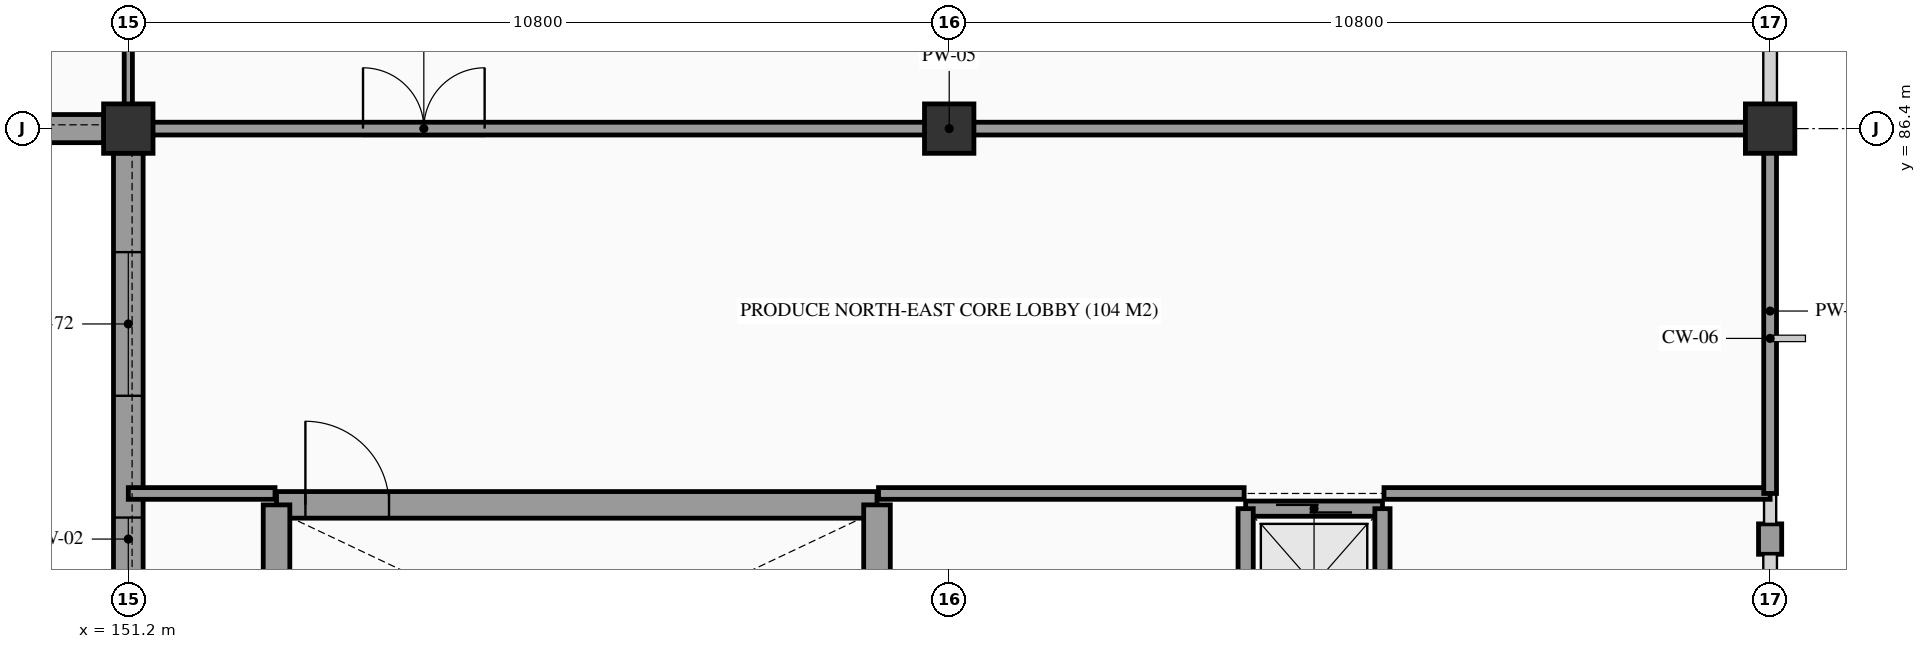
"""IFC4 building model, lengths in metres.
Left out: names, types, materials, properties, quantities, classifications, styles, units other than length and angle.
Written with IfcOpenShell. Run it as: python <this file> out.ifc"""

import sys

from ifc_helpers import new_model, si_unit, direction, frame, frame_2d, origin, origin_2d, place, context, subcontext, project, spatial, rectangle, extrude, element, fill, save


model = new_model("IFC4")
c1 = context("Model", 3, precision=1e-05, world=origin(), true_north=direction((0.0, 1.0)))
c2 = subcontext(c1, "Body", "Model", "MODEL_VIEW")
j1 = project(units=[si_unit("LENGTHUNIT", "METRE"), si_unit("PLANEANGLEUNIT", "RADIAN")], contexts=[c1])
p1 = place(None, origin())
s1 = spatial("IfcSite", under=j1, at=p1, CompositionType="ELEMENT")
p2 = place(p1, origin())
s2 = spatial("IfcBuilding", under=s1, at=p2, CompositionType="ELEMENT")
p3 = place(p2, frame((0.0, 0.0, 5.4)))
s3 = spatial("IfcBuildingStorey", under=s2, at=p3, CompositionType="ELEMENT", Elevation=5.4)
for number, where, z_axis, x_axis in (
    (1, (151.2, 86.4, 0.0), (0.0, 0.0, 1.0), (1.0, 0.0, 0.0)),
    (2, (162.0, 86.4, 0.0), (0.0, 0.0, 1.0), (1.0, 0.0, 0.0)),
    (3, (172.8, 86.4, 0.0), (0.0, 0.0, 1.0), (1.0, 0.0, 0.0)),
):
    element("IfcColumn", number, at=place(p3, frame(where, z_axis=z_axis, x_axis=x_axis)), inside=s3, PredefinedType="COLUMN", context=c2, shape_type="SweptSolid", body=[
        extrude(rectangle(XDim=0.65, YDim=0.65, at=origin_2d()), origin(), (0.0, 0.0, 1.0), 4.68),
    ])
p4 = place(p3, frame((140.72, 86.4, 0.0), z_axis=(0.0, 0.0, 1.0), x_axis=(1.0, 0.0, 0.0)))
e4 = element("IfcWall", 4, at=p4, inside=s3, PredefinedType="STANDARD", context=c2, shape_type="SweptSolid", body=[
    extrude(rectangle(XDim=10.16, YDim=0.37, at=frame_2d((5.08, 0.0))), origin(), (0.0, 0.0, 1.0), 3.53),
])
p5 = place(p4, frame((1.105, 0.0, 0.95)))
e5 = element("IfcOpeningElement", 5, at=p5, cuts=e4, PredefinedType="OPENING", context=c2, shape_type="SweptSolid", body=[
    extrude(rectangle(XDim=1.89, YDim=1.95, at=frame_2d((0.945, 0.975))), frame((0.0, 0.195, 0.0), z_axis=(0.0, -1.0, 0.0), x_axis=(1.0, 0.0, 0.0)), (0.0, 0.0, 1.0), 0.39),
])
p6 = place(p4, frame((4.455, 0.0, 0.95)))
e6 = element("IfcOpeningElement", 6, at=p6, cuts=e4, PredefinedType="OPENING", context=c2, shape_type="SweptSolid", body=[
    extrude(rectangle(XDim=1.05, YDim=2.1, at=frame_2d((0.525, 1.05))), frame((0.0, 0.195, 0.0), z_axis=(0.0, -1.0, 0.0), x_axis=(1.0, 0.0, 0.0)), (0.0, 0.0, 1.0), 0.39),
])
p7 = place(p4, frame((7.325, 0.0, 0.95)))
e7 = element("IfcOpeningElement", 7, at=p7, cuts=e4, PredefinedType="OPENING", context=c2, shape_type="SweptSolid", body=[
    extrude(rectangle(XDim=1.17, YDim=2.1, at=frame_2d((0.585, 1.05))), frame((0.0, 0.195, 0.0), z_axis=(0.0, -1.0, 0.0), x_axis=(1.0, 0.0, 0.0)), (0.0, 0.0, 1.0), 0.39),
])
p8 = place(p3, frame((151.2, 75.92, 0.0), z_axis=(0.0, 0.0, 1.0), x_axis=(0.0, 1.0, 0.0)))
e8 = element("IfcWall", 8, at=p8, inside=s3, PredefinedType="STANDARD", context=c2, shape_type="SweptSolid", body=[
    extrude(rectangle(XDim=10.16, YDim=0.39, at=frame_2d((5.08, 0.0))), origin(), (0.0, 0.0, 1.0), 3.53),
])
p9 = place(p8, frame((1.225, 0.0, 0.95)))
e9 = element("IfcOpeningElement", 9, at=p9, cuts=e8, PredefinedType="OPENING", context=c2, shape_type="SweptSolid", body=[
    extrude(rectangle(XDim=1.65, YDim=2.1, at=frame_2d((0.825, 1.05))), frame((0.0, 0.205, 0.0), z_axis=(0.0, -1.0, 0.0), x_axis=(1.0, 0.0, 0.0)), (0.0, 0.0, 1.0), 0.41),
])
p10 = place(p8, frame((3.593, 0.0, 0.95)))
e10 = element("IfcOpeningElement", 10, at=p10, cuts=e8, PredefinedType="OPENING", context=c2, shape_type="SweptSolid", body=[
    extrude(rectangle(XDim=1.77, YDim=2.1, at=frame_2d((0.885, 1.05))), frame((0.0, 0.205, 0.0), z_axis=(0.0, -1.0, 0.0), x_axis=(1.0, 0.0, 0.0)), (0.0, 0.0, 1.0), 0.41),
])
p11 = place(p8, frame((6.965, 0.0, 0.95)))
e11 = element("IfcOpeningElement", 11, at=p11, cuts=e8, PredefinedType="OPENING", context=c2, shape_type="SweptSolid", body=[
    extrude(rectangle(XDim=1.89, YDim=2.1, at=frame_2d((0.945, 1.05))), frame((0.0, 0.205, 0.0), z_axis=(0.0, -1.0, 0.0), x_axis=(1.0, 0.0, 0.0)), (0.0, 0.0, 1.0), 0.41),
])
p12 = place(p3, frame((172.8, 80.8, 0.0), z_axis=(0.0, 0.0, 1.0), x_axis=(0.0, 1.0, 0.0)))
e12 = element("IfcWall", 12, at=p12, inside=s3, PredefinedType="STANDARD", context=c2, shape_type="SweptSolid", body=[
    extrude(rectangle(XDim=0.4, YDim=0.305, at=frame_2d((0.2, 0.0))), origin(), (0.0, 0.0, 1.0), 2.38),
])
p13 = place(p3, frame((153.15, 81.45, 0.0), z_axis=(0.0, 0.0, 1.0), x_axis=(1.0, 0.0, 0.0)))
e13 = element("IfcWall", 13, at=p13, inside=s3, PredefinedType="SHEAR", context=c2, shape_type="SweptSolid", body=[
    extrude(rectangle(XDim=7.9, YDim=0.35, at=frame_2d((3.95, 0.0))), origin(), (0.0, 0.0, 1.0), 4.68),
])
p14 = place(p13, frame((0.38, 0.0, 0.0)))
e14 = element("IfcOpeningElement", 14, at=p14, cuts=e13, PredefinedType="OPENING", context=c2, shape_type="SweptSolid", body=[
    extrude(rectangle(XDim=1.1, YDim=2.2, at=frame_2d((0.55, 1.1))), frame((0.0, 0.185, 0.0), z_axis=(0.0, -1.0, 0.0), x_axis=(1.0, 0.0, 0.0)), (0.0, 0.0, 1.0), 0.37),
])
for number, where, z_axis, x_axis in (
    (15, (153.15, 77.55, 0.0), (0.0, 0.0, 1.0), (0.0, 1.0, 0.0)),
    (16, (161.05, 77.55, 0.0), (0.0, 0.0, 1.0), (0.0, 1.0, 0.0)),
):
    element("IfcWall", number, at=place(p3, frame(where, z_axis=z_axis, x_axis=x_axis)), inside=s3, PredefinedType="SHEAR", context=c2, shape_type="SweptSolid", body=[
        extrude(rectangle(XDim=3.9, YDim=0.35, at=frame_2d((1.95, 0.0))), origin(), (0.0, 0.0, 1.0), 4.68),
    ])
p15 = place(p3, frame((165.9, 81.4, 0.0), z_axis=(0.0, 0.0, 1.0), x_axis=(1.0, 0.0, 0.0)))
e17 = element("IfcWall", 17, at=p15, inside=s3, PredefinedType="SOLIDWALL", context=c2, shape_type="SweptSolid", body=[
    extrude(rectangle(XDim=1.8, YDim=0.2, at=frame_2d((0.9, 0.0))), origin(), (0.0, 0.0, 1.0), 3.5),
])
p16 = place(p15, frame((0.4, 0.0, 0.0)))
e18 = element("IfcOpeningElement", 18, at=p16, cuts=e17, PredefinedType="OPENING", context=c2, shape_type="SweptSolid", body=[
    extrude(rectangle(XDim=1.0, YDim=2.15, at=frame_2d((0.5, 1.075))), frame((0.0, 0.11, 0.0), z_axis=(0.0, -1.0, 0.0), x_axis=(1.0, 0.0, 0.0)), (0.0, 0.0, 1.0), 0.22),
])
for number, where, z_axis, x_axis in (
    (19, (165.9, 79.4, 0.0), (0.0, 0.0, 1.0), (0.0, 1.0, 0.0)),
    (20, (167.7, 79.4, 0.0), (0.0, 0.0, 1.0), (0.0, 1.0, 0.0)),
):
    element("IfcWall", number, at=place(p3, frame(where, z_axis=z_axis, x_axis=x_axis)), inside=s3, PredefinedType="SOLIDWALL", context=c2, shape_type="SweptSolid", body=[
        extrude(rectangle(XDim=2.0, YDim=0.2, at=frame_2d((1.0, 0.0))), origin(), (0.0, 0.0, 1.0), 3.5),
    ])
p17 = place(p3, frame((151.2, 86.4, 0.0), z_axis=(0.0, 0.0, 1.0), x_axis=(1.0, 0.0, 0.0)))
e21 = element("IfcWall", 21, at=p17, inside=s3, PredefinedType="PARTITIONING", context=c2, shape_type="SweptSolid", body=[
    extrude(rectangle(XDim=21.6, YDim=0.168, at=frame_2d((10.8, 0.0))), origin(), (0.0, 0.0, 1.0), 2.38),
])
p18 = place(p17, frame((3.088, 0.0, 0.0)))
e22 = element("IfcOpeningElement", 22, at=p18, cuts=e21, PredefinedType="OPENING", context=c2, shape_type="SweptSolid", body=[
    extrude(rectangle(XDim=1.6, YDim=2.2, at=frame_2d((0.8, 1.1))), frame((0.0, 0.094, 0.0), z_axis=(0.0, -1.0, 0.0), x_axis=(1.0, 0.0, 0.0)), (0.0, 0.0, 1.0), 0.188),
])
p19 = place(p3, frame((151.2, 81.6, 0.0), z_axis=(0.0, 0.0, 1.0), x_axis=(1.0, 0.0, 0.0)))
e23 = element("IfcWall", 23, at=p19, inside=s3, PredefinedType="PARTITIONING", context=c2, shape_type="SweptSolid", body=[
    extrude(rectangle(XDim=1.93, YDim=0.154, at=frame_2d((0.965, 0.0))), origin(), (0.0, 0.0, 1.0), 3.23),
])
p20 = place(p3, frame((161.07, 81.6, 0.0), z_axis=(0.0, 0.0, 1.0), x_axis=(1.0, 0.0, 0.0)))
e24 = element("IfcWall", 24, at=p20, inside=s3, PredefinedType="PARTITIONING", context=c2, shape_type="SweptSolid", body=[
    extrude(rectangle(XDim=4.81, YDim=0.154, at=frame_2d((2.405, 0.0))), origin(), (0.0, 0.0, 1.0), 3.23),
])
p21 = place(p3, frame((167.72, 81.6, 0.0), z_axis=(0.0, 0.0, 1.0), x_axis=(1.0, 0.0, 0.0)))
e25 = element("IfcWall", 25, at=p21, inside=s3, PredefinedType="PARTITIONING", context=c2, shape_type="SweptSolid", body=[
    extrude(rectangle(XDim=5.08, YDim=0.154, at=frame_2d((2.54, 0.0))), origin(), (0.0, 0.0, 1.0), 3.23),
])
p22 = place(p3, frame((151.2, 86.4, 0.0), z_axis=(0.0, 0.0, 1.0), x_axis=(0.0, 1.0, 0.0)))
e26 = element("IfcWall", 26, at=p22, inside=s3, PredefinedType="PARTITIONING", context=c2, shape_type="SweptSolid", body=[
    extrude(rectangle(XDim=21.6, YDim=0.108, at=frame_2d((10.8, 0.0))), origin(), (0.0, 0.0, 1.0), 3.23),
])
p23 = place(p3, frame((172.8, 81.6, 0.0), z_axis=(0.0, 0.0, 1.0), x_axis=(0.0, 1.0, 0.0)))
e27 = element("IfcWall", 27, at=p23, inside=s3, PredefinedType="PARTITIONING", context=c2, shape_type="SweptSolid", body=[
    extrude(rectangle(XDim=4.8, YDim=0.168, at=frame_2d((2.4, 0.0))), origin(), (0.0, 0.0, 1.0), 2.38),
])
p24 = place(p10, origin())
e28 = element("IfcWindow", 28, at=p24, inside=s3, PartitioningType="SINGLE_PANEL", PredefinedType="WINDOW", context=c2, shape_type="SweptSolid", body=[
    extrude(rectangle(XDim=1.77, YDim=2.1, at=frame_2d((0.885, 1.05))), frame((0.0, 0.03, 0.0), z_axis=(0.0, -1.0, 0.0), x_axis=(1.0, 0.0, 0.0)), (0.0, 0.0, 1.0), 0.06),
])
fill(e10, e28)
p25 = place(p11, origin())
e29 = element("IfcWindow", 29, at=p25, inside=s3, PartitioningType="SINGLE_PANEL", PredefinedType="WINDOW", context=c2, shape_type="SweptSolid", body=[
    extrude(rectangle(XDim=1.89, YDim=2.1, at=frame_2d((0.945, 1.05))), frame((0.0, 0.03, 0.0), z_axis=(0.0, -1.0, 0.0), x_axis=(1.0, 0.0, 0.0)), (0.0, 0.0, 1.0), 0.06),
])
fill(e11, e29)
p26 = place(p14, origin())
e30 = element("IfcDoor", 30, at=p26, inside=s3, OperationType="SINGLE_SWING_LEFT", PredefinedType="DOOR", context=c2, shape_type="SweptSolid", body=[
    extrude(rectangle(XDim=1.1, YDim=2.2, at=frame_2d((0.55, 1.1))), frame((0.0, 0.025, 0.0), z_axis=(0.0, -1.0, 0.0), x_axis=(1.0, 0.0, 0.0)), (0.0, 0.0, 1.0), 0.05),
])
fill(e14, e30)
p27 = place(p16, origin())
e31 = element("IfcDoor", 31, at=p27, inside=s3, OperationType="DOUBLE_DOOR_SLIDING", PredefinedType="DOOR", context=c2, shape_type="SweptSolid", body=[
    extrude(rectangle(XDim=1.0, YDim=2.15, at=frame_2d((0.5, 1.075))), frame((0.0, 0.025, 0.0), z_axis=(0.0, -1.0, 0.0), x_axis=(1.0, 0.0, 0.0)), (0.0, 0.0, 1.0), 0.05),
])
fill(e18, e31)
p28 = place(p18, origin())
e32 = element("IfcDoor", 32, at=p28, inside=s3, OperationType="DOUBLE_DOOR_SINGLE_SWING", PredefinedType="DOOR", context=c2, shape_type="SweptSolid", body=[
    extrude(rectangle(XDim=1.6, YDim=2.2, at=frame_2d((0.8, 1.1))), frame((0.0, 0.025, 0.0), z_axis=(0.0, -1.0, 0.0), x_axis=(1.0, 0.0, 0.0)), (0.0, 0.0, 1.0), 0.05),
])
fill(e22, e32)
save(model, sys.argv[1])
